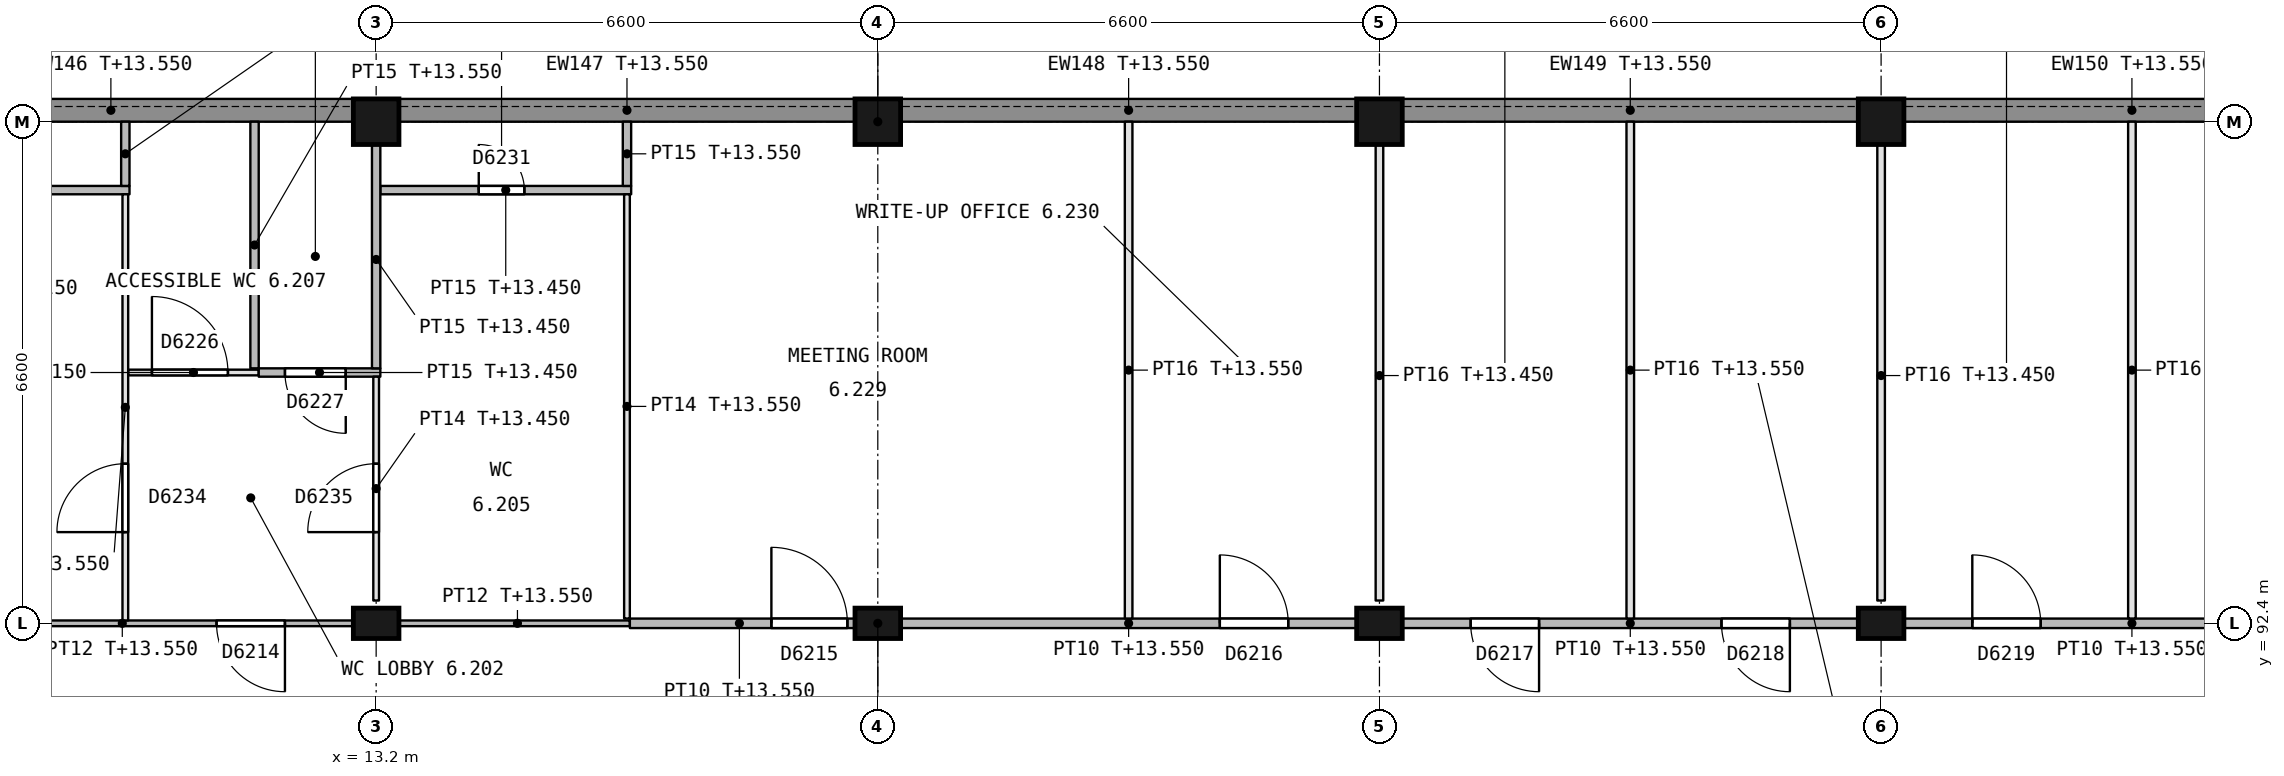
"""IFC4 building model, lengths in metres.
Left out: names, types, materials, properties, quantities, classifications, styles, units other than length and angle.
Written with IfcOpenShell. Run it as: python <this file> out.ifc"""

import sys

from ifc_helpers import new_model, si_unit, direction, frame, frame_2d, origin, origin_2d, place, context, subcontext, project, spatial, rectangle, extrude, element, fill, save


model = new_model("IFC4")
c1 = context("Model", 3, precision=1e-05, world=origin(), true_north=direction((0.0, 1.0)))
c2 = subcontext(c1, "Body", "Model", "MODEL_VIEW")
j1 = project(units=[si_unit("LENGTHUNIT", "METRE"), si_unit("PLANEANGLEUNIT", "RADIAN")], contexts=[c1])
p1 = place(None, origin())
s1 = spatial("IfcSite", under=j1, at=p1, CompositionType="ELEMENT")
p2 = place(p1, origin())
s2 = spatial("IfcBuilding", under=s1, at=p2, CompositionType="ELEMENT")
p3 = place(p2, frame((0.0, 0.0, 9.9)))
s3 = spatial("IfcBuildingStorey", under=s2, at=p3, CompositionType="ELEMENT", Elevation=9.9)
p4 = place(p3, frame((13.2, 92.4, 0.0), z_axis=(0.0, 0.0, 1.0), x_axis=(1.0, 0.0, 0.0)))
e1 = element("IfcColumn", 1, at=p4, inside=s3, PredefinedType="COLUMN", context=c2, shape_type="SweptSolid", body=[
    extrude(rectangle(XDim=0.6, YDim=0.4, at=origin_2d()), origin(), (0.0, 0.0, 1.0), 4.5),
])
p5 = place(p3, frame((13.2, 99.0, 0.0), z_axis=(0.0, 0.0, 1.0), x_axis=(1.0, 0.0, 0.0)))
e2 = element("IfcColumn", 2, at=p5, inside=s3, PredefinedType="COLUMN", context=c2, shape_type="SweptSolid", body=[
    extrude(rectangle(XDim=0.6, YDim=0.6, at=origin_2d()), origin(), (0.0, 0.0, 1.0), 4.5),
])
p6 = place(p3, frame((19.8, 92.4, 0.0), z_axis=(0.0, 0.0, 1.0), x_axis=(1.0, 0.0, 0.0)))
e3 = element("IfcColumn", 3, at=p6, inside=s3, PredefinedType="COLUMN", context=c2, shape_type="SweptSolid", body=[
    extrude(rectangle(XDim=0.6, YDim=0.4, at=origin_2d()), origin(), (0.0, 0.0, 1.0), 4.5),
])
p7 = place(p3, frame((19.8, 99.0, 0.0), z_axis=(0.0, 0.0, 1.0), x_axis=(1.0, 0.0, 0.0)))
e4 = element("IfcColumn", 4, at=p7, inside=s3, PredefinedType="COLUMN", context=c2, shape_type="SweptSolid", body=[
    extrude(rectangle(XDim=0.6, YDim=0.6, at=origin_2d()), origin(), (0.0, 0.0, 1.0), 4.5),
])
p8 = place(p3, frame((26.4, 92.4, 0.0), z_axis=(0.0, 0.0, 1.0), x_axis=(1.0, 0.0, 0.0)))
e5 = element("IfcColumn", 5, at=p8, inside=s3, PredefinedType="COLUMN", context=c2, shape_type="SweptSolid", body=[
    extrude(rectangle(XDim=0.6, YDim=0.4, at=origin_2d()), origin(), (0.0, 0.0, 1.0), 4.5),
])
p9 = place(p3, frame((26.4, 99.0, 0.0), z_axis=(0.0, 0.0, 1.0), x_axis=(1.0, 0.0, 0.0)))
e6 = element("IfcColumn", 6, at=p9, inside=s3, PredefinedType="COLUMN", context=c2, shape_type="SweptSolid", body=[
    extrude(rectangle(XDim=0.6, YDim=0.6, at=origin_2d()), origin(), (0.0, 0.0, 1.0), 4.5),
])
p10 = place(p3, frame((33.0, 92.4, 0.0), z_axis=(0.0, 0.0, 1.0), x_axis=(1.0, 0.0, 0.0)))
e7 = element("IfcColumn", 7, at=p10, inside=s3, PredefinedType="COLUMN", context=c2, shape_type="SweptSolid", body=[
    extrude(rectangle(XDim=0.6, YDim=0.4, at=origin_2d()), origin(), (0.0, 0.0, 1.0), 4.5),
])
p11 = place(p3, frame((33.0, 99.0, 0.0), z_axis=(0.0, 0.0, 1.0), x_axis=(1.0, 0.0, 0.0)))
e8 = element("IfcColumn", 8, at=p11, inside=s3, PredefinedType="COLUMN", context=c2, shape_type="SweptSolid", body=[
    extrude(rectangle(XDim=0.6, YDim=0.6, at=origin_2d()), origin(), (0.0, 0.0, 1.0), 4.5),
])
p12 = place(p3, frame((6.6, 99.15, 0.0), z_axis=(0.0, 0.0, 1.0), x_axis=(1.0, 0.0, 0.0)))
e9 = element("IfcWall", 9, at=p12, inside=s3, PredefinedType="STANDARD", context=c2, shape_type="SweptSolid", body=[
    extrude(rectangle(XDim=6.3, YDim=0.3, at=frame_2d((3.15, 0.0))), origin(), (0.0, 0.0, 1.0), 3.65),
])
for number, where, z_axis, x_axis in (
    (10, (13.5, 99.15, 0.0), (0.0, 0.0, 1.0), (1.0, 0.0, 0.0)),
    (11, (20.1, 99.15, 0.0), (0.0, 0.0, 1.0), (1.0, 0.0, 0.0)),
    (12, (26.7, 99.15, 0.0), (0.0, 0.0, 1.0), (1.0, 0.0, 0.0)),
    (13, (33.3, 99.15, 0.0), (0.0, 0.0, 1.0), (1.0, 0.0, 0.0)),
):
    element("IfcWall", number, at=place(p3, frame(where, z_axis=z_axis, x_axis=x_axis)), inside=s3, PredefinedType="STANDARD", context=c2, shape_type="SweptSolid", body=[
        extrude(rectangle(XDim=6.0, YDim=0.3, at=frame_2d((3.0, 0.0))), origin(), (0.0, 0.0, 1.0), 3.65),
    ])
p13 = place(p3, frame((6.9, 92.4, 0.0), z_axis=(0.0, 0.0, 1.0), x_axis=(1.0, 0.0, 0.0)))
e14 = element("IfcWall", 14, at=p13, inside=s3, PredefinedType="PARTITIONING", context=c2, shape_type="SweptSolid", body=[
    extrude(rectangle(XDim=6.0, YDim=0.075, at=frame_2d((3.0, 0.0))), origin(), (0.0, 0.0, 1.0), 3.65),
])
p14 = place(p13, frame((4.2, 0.0, 0.0)))
e15 = element("IfcOpeningElement", 15, at=p14, cuts=e14, PredefinedType="OPENING", context=c2, shape_type="SweptSolid", body=[
    extrude(rectangle(XDim=0.9, YDim=2.1, at=frame_2d((0.45, 1.05))), frame((0.0, 0.047, 0.0), z_axis=(0.0, -1.0, 0.0), x_axis=(1.0, 0.0, 0.0)), (0.0, 0.0, 1.0), 0.095),
])
p15 = place(p3, frame((13.5, 92.4, 0.0), z_axis=(0.0, 0.0, 1.0), x_axis=(1.0, 0.0, 0.0)))
e16 = element("IfcWall", 16, at=p15, inside=s3, PredefinedType="PARTITIONING", context=c2, shape_type="SweptSolid", body=[
    extrude(rectangle(XDim=3.038, YDim=0.075, at=frame_2d((1.519, 0.0))), origin(), (0.0, 0.0, 1.0), 3.65),
])
p16 = place(p3, frame((16.538, 92.4, 0.0), z_axis=(0.0, 0.0, 1.0), x_axis=(1.0, 0.0, 0.0)))
e17 = element("IfcWall", 17, at=p16, inside=s3, PredefinedType="PARTITIONING", context=c2, shape_type="SweptSolid", body=[
    extrude(rectangle(XDim=2.962, YDim=0.125, at=frame_2d((1.481, 0.0))), origin(), (0.0, 0.0, 1.0), 3.65),
])
p17 = place(p16, frame((1.862, 0.0, 0.0)))
e18 = element("IfcOpeningElement", 18, at=p17, cuts=e17, PredefinedType="OPENING", context=c2, shape_type="SweptSolid", body=[
    extrude(rectangle(XDim=1.0, YDim=2.1, at=frame_2d((0.5, 1.05))), frame((0.0, 0.073, 0.0), z_axis=(0.0, -1.0, 0.0), x_axis=(1.0, 0.0, 0.0)), (0.0, 0.0, 1.0), 0.145),
])
p18 = place(p3, frame((20.1, 92.4, 0.0), z_axis=(0.0, 0.0, 1.0), x_axis=(1.0, 0.0, 0.0)))
e19 = element("IfcWall", 19, at=p18, inside=s3, PredefinedType="PARTITIONING", context=c2, shape_type="SweptSolid", body=[
    extrude(rectangle(XDim=6.0, YDim=0.125, at=frame_2d((3.0, 0.0))), origin(), (0.0, 0.0, 1.0), 3.65),
])
p19 = place(p18, frame((4.2, 0.0, 0.0)))
e20 = element("IfcOpeningElement", 20, at=p19, cuts=e19, PredefinedType="OPENING", context=c2, shape_type="SweptSolid", body=[
    extrude(rectangle(XDim=0.9, YDim=2.1, at=frame_2d((0.45, 1.05))), frame((0.0, 0.073, 0.0), z_axis=(0.0, -1.0, 0.0), x_axis=(1.0, 0.0, 0.0)), (0.0, 0.0, 1.0), 0.145),
])
p20 = place(p3, frame((26.7, 92.4, 0.0), z_axis=(0.0, 0.0, 1.0), x_axis=(1.0, 0.0, 0.0)))
e21 = element("IfcWall", 21, at=p20, inside=s3, PredefinedType="PARTITIONING", context=c2, shape_type="SweptSolid", body=[
    extrude(rectangle(XDim=6.0, YDim=0.125, at=frame_2d((3.0, 0.0))), origin(), (0.0, 0.0, 1.0), 3.65),
])
p21 = place(p20, frame((0.9, 0.0, 0.0)))
e22 = element("IfcOpeningElement", 22, at=p21, cuts=e21, PredefinedType="OPENING", context=c2, shape_type="SweptSolid", body=[
    extrude(rectangle(XDim=0.9, YDim=2.1, at=frame_2d((0.45, 1.05))), frame((0.0, 0.073, 0.0), z_axis=(0.0, -1.0, 0.0), x_axis=(1.0, 0.0, 0.0)), (0.0, 0.0, 1.0), 0.145),
])
p22 = place(p20, frame((4.2, 0.0, 0.0)))
e23 = element("IfcOpeningElement", 23, at=p22, cuts=e21, PredefinedType="OPENING", context=c2, shape_type="SweptSolid", body=[
    extrude(rectangle(XDim=0.9, YDim=2.1, at=frame_2d((0.45, 1.05))), frame((0.0, 0.073, 0.0), z_axis=(0.0, -1.0, 0.0), x_axis=(1.0, 0.0, 0.0)), (0.0, 0.0, 1.0), 0.145),
])
p23 = place(p3, frame((33.3, 92.4, 0.0), z_axis=(0.0, 0.0, 1.0), x_axis=(1.0, 0.0, 0.0)))
e24 = element("IfcWall", 24, at=p23, inside=s3, PredefinedType="PARTITIONING", context=c2, shape_type="SweptSolid", body=[
    extrude(rectangle(XDim=6.0, YDim=0.125, at=frame_2d((3.0, 0.0))), origin(), (0.0, 0.0, 1.0), 3.65),
])
p24 = place(p23, frame((0.9, 0.0, 0.0)))
e25 = element("IfcOpeningElement", 25, at=p24, cuts=e24, PredefinedType="OPENING", context=c2, shape_type="SweptSolid", body=[
    extrude(rectangle(XDim=0.9, YDim=2.1, at=frame_2d((0.45, 1.05))), frame((0.0, 0.073, 0.0), z_axis=(0.0, -1.0, 0.0), x_axis=(1.0, 0.0, 0.0)), (0.0, 0.0, 1.0), 0.145),
])
p25 = place(p23, frame((4.2, 0.0, 0.0)))
e26 = element("IfcOpeningElement", 26, at=p25, cuts=e24, PredefinedType="OPENING", context=c2, shape_type="SweptSolid", body=[
    extrude(rectangle(XDim=0.9, YDim=2.1, at=frame_2d((0.45, 1.05))), frame((0.0, 0.073, 0.0), z_axis=(0.0, -1.0, 0.0), x_axis=(1.0, 0.0, 0.0)), (0.0, 0.0, 1.0), 0.145),
])
p26 = place(p3, frame((11.655, 95.7, 0.0), z_axis=(0.0, 0.0, 1.0), x_axis=(-1.0, 0.0, 0.0)))
e27 = element("IfcWall", 27, at=p26, inside=s3, PredefinedType="PARTITIONING", context=c2, shape_type="SweptSolid", body=[
    extrude(rectangle(XDim=1.717, YDim=0.075, at=frame_2d((0.858, 0.0))), origin(), (0.0, 0.0, 1.0), 4.25),
])
p27 = place(p26, frame((0.405, 0.0, 0.0)))
e28 = element("IfcOpeningElement", 28, at=p27, cuts=e27, PredefinedType="OPENING", context=c2, shape_type="SweptSolid", body=[
    extrude(rectangle(XDim=1.0, YDim=2.1, at=frame_2d((0.5, 1.05))), frame((0.0, 0.047, 0.0), z_axis=(0.0, -1.0, 0.0), x_axis=(1.0, 0.0, 0.0)), (0.0, 0.0, 1.0), 0.095),
])
p28 = place(p3, frame((11.655, 95.7, 0.0), z_axis=(0.0, 0.0, 1.0), x_axis=(1.0, 0.0, 0.0)))
e29 = element("IfcWall", 29, at=p28, inside=s3, PredefinedType="PARTITIONING", context=c2, shape_type="SweptSolid", body=[
    extrude(rectangle(XDim=1.6, YDim=0.11, at=frame_2d((0.8, 0.0))), origin(), (0.0, 0.0, 1.0), 3.55),
])
p29 = place(p28, frame((0.345, 0.0, 0.0)))
e30 = element("IfcOpeningElement", 30, at=p29, cuts=e29, PredefinedType="OPENING", context=c2, shape_type="SweptSolid", body=[
    extrude(rectangle(XDim=0.8, YDim=2.1, at=frame_2d((0.4, 1.05))), frame((0.0, 0.065, 0.0), z_axis=(0.0, -1.0, 0.0), x_axis=(1.0, 0.0, 0.0)), (0.0, 0.0, 1.0), 0.13),
])
p30 = place(p3, frame((9.955, 98.1, 0.0), z_axis=(0.0, 0.0, 1.0), x_axis=(-1.0, 0.0, 0.0)))
e31 = element("IfcWall", 31, at=p30, inside=s3, PredefinedType="PARTITIONING", context=c2, shape_type="SweptSolid", body=[
    extrude(rectangle(XDim=3.355, YDim=0.11, at=frame_2d((1.677, 0.0))), origin(), (0.0, 0.0, 1.0), 4.25),
])
p31 = place(p30, frame((1.405, 0.0, 0.0)))
e32 = element("IfcOpeningElement", 32, at=p31, cuts=e31, PredefinedType="OPENING", context=c2, shape_type="SweptSolid", body=[
    extrude(rectangle(XDim=0.6, YDim=2.1, at=frame_2d((0.3, 1.05))), frame((0.0, 0.065, 0.0), z_axis=(0.0, -1.0, 0.0), x_axis=(1.0, 0.0, 0.0)), (0.0, 0.0, 1.0), 0.13),
])
p32 = place(p3, frame((16.555, 98.1, 0.0), z_axis=(0.0, 0.0, 1.0), x_axis=(-1.0, 0.0, 0.0)))
e33 = element("IfcWall", 33, at=p32, inside=s3, PredefinedType="PARTITIONING", context=c2, shape_type="SweptSolid", body=[
    extrude(rectangle(XDim=3.3, YDim=0.11, at=frame_2d((1.65, 0.0))), origin(), (0.0, 0.0, 1.0), 3.55),
])
p33 = place(p32, frame((1.405, 0.0, 0.0)))
e34 = element("IfcOpeningElement", 34, at=p33, cuts=e33, PredefinedType="OPENING", context=c2, shape_type="SweptSolid", body=[
    extrude(rectangle(XDim=0.6, YDim=2.1, at=frame_2d((0.3, 1.05))), frame((0.0, 0.065, 0.0), z_axis=(0.0, -1.0, 0.0), x_axis=(1.0, 0.0, 0.0)), (0.0, 0.0, 1.0), 0.13),
])
p34 = place(p3, frame((9.9, 92.438, 0.0), z_axis=(0.0, 0.0, 1.0), x_axis=(0.0, 1.0, 0.0)))
e35 = element("IfcWall", 35, at=p34, inside=s3, PredefinedType="PARTITIONING", context=c2, shape_type="SweptSolid", body=[
    extrude(rectangle(XDim=5.607, YDim=0.075, at=frame_2d((2.803, 0.0))), origin(), (0.0, 0.0, 1.0), 3.65),
])
p35 = place(p34, frame((1.162, 0.0, 0.0)))
e36 = element("IfcOpeningElement", 36, at=p35, cuts=e35, PredefinedType="OPENING", context=c2, shape_type="SweptSolid", body=[
    extrude(rectangle(XDim=0.9, YDim=2.1, at=frame_2d((0.45, 1.05))), frame((0.0, 0.047, 0.0), z_axis=(0.0, -1.0, 0.0), x_axis=(1.0, 0.0, 0.0)), (0.0, 0.0, 1.0), 0.095),
])
p36 = place(p3, frame((9.9, 98.155, 0.0), z_axis=(0.0, 0.0, 1.0), x_axis=(0.0, 1.0, 0.0)))
e37 = element("IfcWall", 37, at=p36, inside=s3, PredefinedType="PARTITIONING", context=c2, shape_type="SweptSolid", body=[
    extrude(rectangle(XDim=0.845, YDim=0.11, at=frame_2d((0.422, 0.0))), origin(), (0.0, 0.0, 1.0), 3.65),
])
p37 = place(p3, frame((11.6, 95.755, 0.0), z_axis=(0.0, 0.0, 1.0), x_axis=(0.0, 1.0, 0.0)))
e38 = element("IfcWall", 38, at=p37, inside=s3, PredefinedType="PARTITIONING", context=c2, shape_type="SweptSolid", body=[
    extrude(rectangle(XDim=3.245, YDim=0.11, at=frame_2d((1.623, 0.0))), origin(), (0.0, 0.0, 1.0), 3.65),
])
p38 = place(p3, frame((13.2, 95.645, 0.0), z_axis=(0.0, 0.0, 1.0), x_axis=(0.0, -1.0, 0.0)))
e39 = element("IfcWall", 39, at=p38, inside=s3, PredefinedType="PARTITIONING", context=c2, shape_type="SweptSolid", body=[
    extrude(rectangle(XDim=2.945, YDim=0.075, at=frame_2d((1.473, 0.0))), origin(), (0.0, 0.0, 1.0), 3.55),
])
p39 = place(p38, frame((1.145, 0.0, 0.0)))
e40 = element("IfcOpeningElement", 40, at=p39, cuts=e39, PredefinedType="OPENING", context=c2, shape_type="SweptSolid", body=[
    extrude(rectangle(XDim=0.9, YDim=2.1, at=frame_2d((0.45, 1.05))), frame((0.0, 0.047, 0.0), z_axis=(0.0, -1.0, 0.0), x_axis=(1.0, 0.0, 0.0)), (0.0, 0.0, 1.0), 0.095),
])
p40 = place(p3, frame((13.2, 95.755, 0.0), z_axis=(0.0, 0.0, 1.0), x_axis=(0.0, 1.0, 0.0)))
e41 = element("IfcWall", 41, at=p40, inside=s3, PredefinedType="PARTITIONING", context=c2, shape_type="SweptSolid", body=[
    extrude(rectangle(XDim=2.945, YDim=0.11, at=frame_2d((1.473, 0.0))), origin(), (0.0, 0.0, 1.0), 3.55),
])
p41 = place(p3, frame((16.5, 92.463, 0.0), z_axis=(0.0, 0.0, 1.0), x_axis=(0.0, 1.0, 0.0)))
e42 = element("IfcWall", 42, at=p41, inside=s3, PredefinedType="PARTITIONING", context=c2, shape_type="SweptSolid", body=[
    extrude(rectangle(XDim=5.582, YDim=0.075, at=frame_2d((2.791, 0.0))), origin(), (0.0, 0.0, 1.0), 3.65),
])
p42 = place(p3, frame((16.5, 98.155, 0.0), z_axis=(0.0, 0.0, 1.0), x_axis=(0.0, 1.0, 0.0)))
e43 = element("IfcWall", 43, at=p42, inside=s3, PredefinedType="PARTITIONING", context=c2, shape_type="SweptSolid", body=[
    extrude(rectangle(XDim=0.845, YDim=0.11, at=frame_2d((0.422, 0.0))), origin(), (0.0, 0.0, 1.0), 3.65),
])
p43 = place(p3, frame((23.1, 92.463, 0.0), z_axis=(0.0, 0.0, 1.0), x_axis=(0.0, 1.0, 0.0)))
e44 = element("IfcWall", 44, at=p43, inside=s3, PredefinedType="PARTITIONING", context=c2, shape_type="SweptSolid", body=[
    extrude(rectangle(XDim=6.537, YDim=0.1, at=frame_2d((3.269, 0.0))), origin(), (0.0, 0.0, 1.0), 3.65),
])
p44 = place(p3, frame((26.4, 92.7, 0.0), z_axis=(0.0, 0.0, 1.0), x_axis=(0.0, 1.0, 0.0)))
e45 = element("IfcWall", 45, at=p44, inside=s3, PredefinedType="PARTITIONING", context=c2, shape_type="SweptSolid", body=[
    extrude(rectangle(XDim=6.0, YDim=0.1, at=frame_2d((3.0, 0.0))), origin(), (0.0, 0.0, 1.0), 3.55),
])
p45 = place(p3, frame((29.7, 92.463, 0.0), z_axis=(0.0, 0.0, 1.0), x_axis=(0.0, 1.0, 0.0)))
e46 = element("IfcWall", 46, at=p45, inside=s3, PredefinedType="PARTITIONING", context=c2, shape_type="SweptSolid", body=[
    extrude(rectangle(XDim=6.537, YDim=0.1, at=frame_2d((3.269, 0.0))), origin(), (0.0, 0.0, 1.0), 3.65),
])
p46 = place(p3, frame((33.0, 92.7, 0.0), z_axis=(0.0, 0.0, 1.0), x_axis=(0.0, 1.0, 0.0)))
e47 = element("IfcWall", 47, at=p46, inside=s3, PredefinedType="PARTITIONING", context=c2, shape_type="SweptSolid", body=[
    extrude(rectangle(XDim=6.0, YDim=0.1, at=frame_2d((3.0, 0.0))), origin(), (0.0, 0.0, 1.0), 3.55),
])
p47 = place(p3, frame((36.3, 92.463, 0.0), z_axis=(0.0, 0.0, 1.0), x_axis=(0.0, 1.0, 0.0)))
e48 = element("IfcWall", 48, at=p47, inside=s3, PredefinedType="PARTITIONING", context=c2, shape_type="SweptSolid", body=[
    extrude(rectangle(XDim=6.537, YDim=0.1, at=frame_2d((3.269, 0.0))), origin(), (0.0, 0.0, 1.0), 3.65),
])
p48 = place(p14, origin())
e49 = element("IfcDoor", 49, at=p48, inside=s3, OperationType="SINGLE_SWING_RIGHT", PredefinedType="DOOR", context=c2, shape_type="SweptSolid", body=[
    extrude(rectangle(XDim=0.9, YDim=2.1, at=frame_2d((0.45, 1.05))), frame((0.0, 0.025, 0.0), z_axis=(0.0, -1.0, 0.0), x_axis=(1.0, 0.0, 0.0)), (0.0, 0.0, 1.0), 0.05),
])
fill(e15, e49)
p49 = place(p17, origin())
e50 = element("IfcDoor", 50, at=p49, inside=s3, OperationType="SINGLE_SWING_LEFT", PredefinedType="DOOR", context=c2, shape_type="SweptSolid", body=[
    extrude(rectangle(XDim=1.0, YDim=2.1, at=frame_2d((0.5, 1.05))), frame((0.0, 0.025, 0.0), z_axis=(0.0, -1.0, 0.0), x_axis=(1.0, 0.0, 0.0)), (0.0, 0.0, 1.0), 0.05),
])
fill(e18, e50)
p50 = place(p19, origin())
e51 = element("IfcDoor", 51, at=p50, inside=s3, OperationType="SINGLE_SWING_LEFT", PredefinedType="DOOR", context=c2, shape_type="SweptSolid", body=[
    extrude(rectangle(XDim=0.9, YDim=2.1, at=frame_2d((0.45, 1.05))), frame((0.0, 0.025, 0.0), z_axis=(0.0, -1.0, 0.0), x_axis=(1.0, 0.0, 0.0)), (0.0, 0.0, 1.0), 0.05),
])
fill(e20, e51)
p51 = place(p21, origin())
e52 = element("IfcDoor", 52, at=p51, inside=s3, OperationType="SINGLE_SWING_RIGHT", PredefinedType="DOOR", context=c2, shape_type="SweptSolid", body=[
    extrude(rectangle(XDim=0.9, YDim=2.1, at=frame_2d((0.45, 1.05))), frame((0.0, 0.025, 0.0), z_axis=(0.0, -1.0, 0.0), x_axis=(1.0, 0.0, 0.0)), (0.0, 0.0, 1.0), 0.05),
])
fill(e22, e52)
p52 = place(p22, origin())
e53 = element("IfcDoor", 53, at=p52, inside=s3, OperationType="SINGLE_SWING_RIGHT", PredefinedType="DOOR", context=c2, shape_type="SweptSolid", body=[
    extrude(rectangle(XDim=0.9, YDim=2.1, at=frame_2d((0.45, 1.05))), frame((0.0, 0.025, 0.0), z_axis=(0.0, -1.0, 0.0), x_axis=(1.0, 0.0, 0.0)), (0.0, 0.0, 1.0), 0.05),
])
fill(e23, e53)
p53 = place(p24, origin())
e54 = element("IfcDoor", 54, at=p53, inside=s3, OperationType="SINGLE_SWING_LEFT", PredefinedType="DOOR", context=c2, shape_type="SweptSolid", body=[
    extrude(rectangle(XDim=0.9, YDim=2.1, at=frame_2d((0.45, 1.05))), frame((0.0, 0.025, 0.0), z_axis=(0.0, -1.0, 0.0), x_axis=(1.0, 0.0, 0.0)), (0.0, 0.0, 1.0), 0.05),
])
fill(e25, e54)
p54 = place(p27, origin())
e55 = element("IfcDoor", 55, at=p54, inside=s3, OperationType="SINGLE_SWING_RIGHT", PredefinedType="DOOR", context=c2, shape_type="SweptSolid", body=[
    extrude(rectangle(XDim=1.0, YDim=2.1, at=frame_2d((0.5, 1.05))), frame((0.0, 0.025, 0.0), z_axis=(0.0, -1.0, 0.0), x_axis=(1.0, 0.0, 0.0)), (0.0, 0.0, 1.0), 0.05),
])
fill(e28, e55)
p55 = place(p29, origin())
e56 = element("IfcDoor", 56, at=p55, inside=s3, OperationType="SINGLE_SWING_RIGHT", PredefinedType="DOOR", context=c2, shape_type="SweptSolid", body=[
    extrude(rectangle(XDim=0.8, YDim=2.1, at=frame_2d((0.4, 1.05))), frame((0.0, 0.025, 0.0), z_axis=(0.0, -1.0, 0.0), x_axis=(1.0, 0.0, 0.0)), (0.0, 0.0, 1.0), 0.05),
])
fill(e30, e56)
p56 = place(p33, origin())
e57 = element("IfcDoor", 57, at=p56, inside=s3, OperationType="SINGLE_SWING_RIGHT", PredefinedType="DOOR", context=c2, shape_type="SweptSolid", body=[
    extrude(rectangle(XDim=0.6, YDim=2.1, at=frame_2d((0.3, 1.05))), frame((0.0, 0.025, 0.0), z_axis=(0.0, -1.0, 0.0), x_axis=(1.0, 0.0, 0.0)), (0.0, 0.0, 1.0), 0.05),
])
fill(e34, e57)
p57 = place(p35, origin())
e58 = element("IfcDoor", 58, at=p57, inside=s3, OperationType="SINGLE_SWING_LEFT", PredefinedType="DOOR", context=c2, shape_type="SweptSolid", body=[
    extrude(rectangle(XDim=0.9, YDim=2.1, at=frame_2d((0.45, 1.05))), frame((0.0, 0.025, 0.0), z_axis=(0.0, -1.0, 0.0), x_axis=(1.0, 0.0, 0.0)), (0.0, 0.0, 1.0), 0.05),
])
fill(e36, e58)
p58 = place(p39, origin())
e59 = element("IfcDoor", 59, at=p58, inside=s3, OperationType="SINGLE_SWING_RIGHT", PredefinedType="DOOR", context=c2, shape_type="SweptSolid", body=[
    extrude(rectangle(XDim=0.9, YDim=2.1, at=frame_2d((0.45, 1.05))), frame((0.0, 0.025, 0.0), z_axis=(0.0, -1.0, 0.0), x_axis=(1.0, 0.0, 0.0)), (0.0, 0.0, 1.0), 0.05),
])
fill(e40, e59)
save(model, sys.argv[1])
